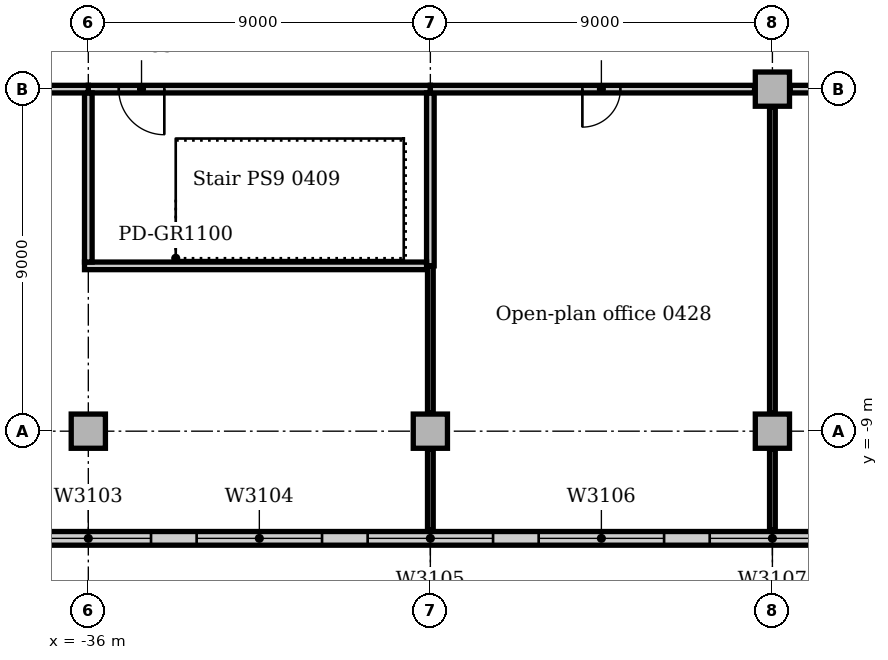
"""IFC4 building model, lengths in metres.
Left out: names, types, materials, properties, quantities, classifications, styles, units other than length and angle.
Written with IfcOpenShell. Run it as: python <this file> out.ifc"""

import sys

from ifc_helpers import new_model, si_unit, direction, frame, frame_2d, origin, origin_2d, place, context, subcontext, project, spatial, rectangle, extrude, element, fill, save


model = new_model("IFC4")
c1 = context("Model", 3, precision=1e-05, world=origin(), true_north=direction((0.0, 1.0)))
c2 = subcontext(c1, "Body", "Model", "MODEL_VIEW")
j1 = project(units=[si_unit("LENGTHUNIT", "METRE"), si_unit("PLANEANGLEUNIT", "RADIAN")], contexts=[c1])
p1 = place(None, origin())
s1 = spatial("IfcSite", under=j1, at=p1, CompositionType="ELEMENT")
p2 = place(p1, origin())
s2 = spatial("IfcBuilding", under=s1, at=p2, CompositionType="ELEMENT")
p3 = place(p2, frame((0.0, 0.0, 21.0)))
s3 = spatial("IfcBuildingStorey", under=s2, at=p3, CompositionType="ELEMENT", Elevation=21.0)
for number, where, z_axis, x_axis in (
    (1, (-36.0, -9.0, 0.0), (0.0, 0.0, 1.0), (1.0, 0.0, 0.0)),
    (2, (-27.0, -9.0, 0.0), (0.0, 0.0, 1.0), (1.0, 0.0, 0.0)),
    (3, (-18.0, -9.0, 0.0), (0.0, 0.0, 1.0), (1.0, 0.0, 0.0)),
    (4, (-18.0, 0.0, 0.0), (0.0, 0.0, 1.0), (1.0, 0.0, 0.0)),
):
    element("IfcColumn", number, at=place(p3, frame(where, z_axis=z_axis, x_axis=x_axis)), inside=s3, PredefinedType="COLUMN", context=c2, shape_type="SweptSolid", body=[
        extrude(rectangle(XDim=0.9, YDim=0.9, at=origin_2d()), origin(), (0.0, 0.0, 1.0), 4.7),
    ])
p4 = place(p3, frame((-81.0, -11.82, 0.0), z_axis=(0.0, 0.0, 1.0), x_axis=(1.0, 0.0, 0.0)))
e5 = element("IfcWall", 5, at=p4, inside=s3, PredefinedType="STANDARD", context=c2, shape_type="SweptSolid", body=[
    extrude(rectangle(XDim=144.0, YDim=0.36, at=frame_2d((72.0, 0.0))), origin(), (0.0, 0.0, 1.0), 4.85),
])
p5 = place(p4, frame((2.85, 0.0, 0.9)))
e6 = element("IfcOpeningElement", 6, at=p5, cuts=e5, PredefinedType="OPENING", context=c2, shape_type="SweptSolid", body=[
    extrude(rectangle(XDim=3.3, YDim=2.4, at=frame_2d((1.65, 1.2))), frame((0.0, 0.19, 0.0), z_axis=(0.0, -1.0, 0.0), x_axis=(1.0, 0.0, 0.0)), (0.0, 0.0, 1.0), 0.38),
])
p6 = place(p4, frame((7.35, 0.0, 0.9)))
e7 = element("IfcOpeningElement", 7, at=p6, cuts=e5, PredefinedType="OPENING", context=c2, shape_type="SweptSolid", body=[
    extrude(rectangle(XDim=3.3, YDim=2.4, at=frame_2d((1.65, 1.2))), frame((0.0, 0.19, 0.0), z_axis=(0.0, -1.0, 0.0), x_axis=(1.0, 0.0, 0.0)), (0.0, 0.0, 1.0), 0.38),
])
p7 = place(p4, frame((11.85, 0.0, 0.9)))
e8 = element("IfcOpeningElement", 8, at=p7, cuts=e5, PredefinedType="OPENING", context=c2, shape_type="SweptSolid", body=[
    extrude(rectangle(XDim=3.3, YDim=2.4, at=frame_2d((1.65, 1.2))), frame((0.0, 0.19, 0.0), z_axis=(0.0, -1.0, 0.0), x_axis=(1.0, 0.0, 0.0)), (0.0, 0.0, 1.0), 0.38),
])
p8 = place(p4, frame((16.35, 0.0, 0.9)))
e9 = element("IfcOpeningElement", 9, at=p8, cuts=e5, PredefinedType="OPENING", context=c2, shape_type="SweptSolid", body=[
    extrude(rectangle(XDim=3.3, YDim=2.4, at=frame_2d((1.65, 1.2))), frame((0.0, 0.19, 0.0), z_axis=(0.0, -1.0, 0.0), x_axis=(1.0, 0.0, 0.0)), (0.0, 0.0, 1.0), 0.38),
])
p9 = place(p4, frame((20.85, 0.0, 0.9)))
e10 = element("IfcOpeningElement", 10, at=p9, cuts=e5, PredefinedType="OPENING", context=c2, shape_type="SweptSolid", body=[
    extrude(rectangle(XDim=3.3, YDim=2.4, at=frame_2d((1.65, 1.2))), frame((0.0, 0.19, 0.0), z_axis=(0.0, -1.0, 0.0), x_axis=(1.0, 0.0, 0.0)), (0.0, 0.0, 1.0), 0.38),
])
p10 = place(p4, frame((25.35, 0.0, 0.9)))
e11 = element("IfcOpeningElement", 11, at=p10, cuts=e5, PredefinedType="OPENING", context=c2, shape_type="SweptSolid", body=[
    extrude(rectangle(XDim=3.3, YDim=2.4, at=frame_2d((1.65, 1.2))), frame((0.0, 0.19, 0.0), z_axis=(0.0, -1.0, 0.0), x_axis=(1.0, 0.0, 0.0)), (0.0, 0.0, 1.0), 0.38),
])
p11 = place(p4, frame((29.85, 0.0, 0.9)))
e12 = element("IfcOpeningElement", 12, at=p11, cuts=e5, PredefinedType="OPENING", context=c2, shape_type="SweptSolid", body=[
    extrude(rectangle(XDim=3.3, YDim=2.4, at=frame_2d((1.65, 1.2))), frame((0.0, 0.19, 0.0), z_axis=(0.0, -1.0, 0.0), x_axis=(1.0, 0.0, 0.0)), (0.0, 0.0, 1.0), 0.38),
])
p12 = place(p4, frame((34.35, 0.0, 0.9)))
e13 = element("IfcOpeningElement", 13, at=p12, cuts=e5, PredefinedType="OPENING", context=c2, shape_type="SweptSolid", body=[
    extrude(rectangle(XDim=3.3, YDim=2.4, at=frame_2d((1.65, 1.2))), frame((0.0, 0.19, 0.0), z_axis=(0.0, -1.0, 0.0), x_axis=(1.0, 0.0, 0.0)), (0.0, 0.0, 1.0), 0.38),
])
p13 = place(p4, frame((38.85, 0.0, 0.9)))
e14 = element("IfcOpeningElement", 14, at=p13, cuts=e5, PredefinedType="OPENING", context=c2, shape_type="SweptSolid", body=[
    extrude(rectangle(XDim=3.3, YDim=2.4, at=frame_2d((1.65, 1.2))), frame((0.0, 0.19, 0.0), z_axis=(0.0, -1.0, 0.0), x_axis=(1.0, 0.0, 0.0)), (0.0, 0.0, 1.0), 0.38),
])
p14 = place(p4, frame((43.35, 0.0, 0.9)))
e15 = element("IfcOpeningElement", 15, at=p14, cuts=e5, PredefinedType="OPENING", context=c2, shape_type="SweptSolid", body=[
    extrude(rectangle(XDim=3.3, YDim=2.4, at=frame_2d((1.65, 1.2))), frame((0.0, 0.19, 0.0), z_axis=(0.0, -1.0, 0.0), x_axis=(1.0, 0.0, 0.0)), (0.0, 0.0, 1.0), 0.38),
])
p15 = place(p4, frame((47.85, 0.0, 0.9)))
e16 = element("IfcOpeningElement", 16, at=p15, cuts=e5, PredefinedType="OPENING", context=c2, shape_type="SweptSolid", body=[
    extrude(rectangle(XDim=3.3, YDim=2.4, at=frame_2d((1.65, 1.2))), frame((0.0, 0.19, 0.0), z_axis=(0.0, -1.0, 0.0), x_axis=(1.0, 0.0, 0.0)), (0.0, 0.0, 1.0), 0.38),
])
p16 = place(p4, frame((52.35, 0.0, 0.9)))
e17 = element("IfcOpeningElement", 17, at=p16, cuts=e5, PredefinedType="OPENING", context=c2, shape_type="SweptSolid", body=[
    extrude(rectangle(XDim=3.3, YDim=2.4, at=frame_2d((1.65, 1.2))), frame((0.0, 0.19, 0.0), z_axis=(0.0, -1.0, 0.0), x_axis=(1.0, 0.0, 0.0)), (0.0, 0.0, 1.0), 0.38),
])
p17 = place(p4, frame((56.85, 0.0, 0.9)))
e18 = element("IfcOpeningElement", 18, at=p17, cuts=e5, PredefinedType="OPENING", context=c2, shape_type="SweptSolid", body=[
    extrude(rectangle(XDim=3.3, YDim=2.4, at=frame_2d((1.65, 1.2))), frame((0.0, 0.19, 0.0), z_axis=(0.0, -1.0, 0.0), x_axis=(1.0, 0.0, 0.0)), (0.0, 0.0, 1.0), 0.38),
])
p18 = place(p4, frame((61.35, 0.0, 0.9)))
e19 = element("IfcOpeningElement", 19, at=p18, cuts=e5, PredefinedType="OPENING", context=c2, shape_type="SweptSolid", body=[
    extrude(rectangle(XDim=3.3, YDim=2.4, at=frame_2d((1.65, 1.2))), frame((0.0, 0.19, 0.0), z_axis=(0.0, -1.0, 0.0), x_axis=(1.0, 0.0, 0.0)), (0.0, 0.0, 1.0), 0.38),
])
p19 = place(p4, frame((65.85, 0.0, 0.9)))
e20 = element("IfcOpeningElement", 20, at=p19, cuts=e5, PredefinedType="OPENING", context=c2, shape_type="SweptSolid", body=[
    extrude(rectangle(XDim=3.3, YDim=2.4, at=frame_2d((1.65, 1.2))), frame((0.0, 0.19, 0.0), z_axis=(0.0, -1.0, 0.0), x_axis=(1.0, 0.0, 0.0)), (0.0, 0.0, 1.0), 0.38),
])
p20 = place(p4, frame((70.35, 0.0, 0.9)))
e21 = element("IfcOpeningElement", 21, at=p20, cuts=e5, PredefinedType="OPENING", context=c2, shape_type="SweptSolid", body=[
    extrude(rectangle(XDim=3.3, YDim=2.4, at=frame_2d((1.65, 1.2))), frame((0.0, 0.19, 0.0), z_axis=(0.0, -1.0, 0.0), x_axis=(1.0, 0.0, 0.0)), (0.0, 0.0, 1.0), 0.38),
])
p21 = place(p4, frame((74.85, 0.0, 0.9)))
e22 = element("IfcOpeningElement", 22, at=p21, cuts=e5, PredefinedType="OPENING", context=c2, shape_type="SweptSolid", body=[
    extrude(rectangle(XDim=3.3, YDim=2.4, at=frame_2d((1.65, 1.2))), frame((0.0, 0.19, 0.0), z_axis=(0.0, -1.0, 0.0), x_axis=(1.0, 0.0, 0.0)), (0.0, 0.0, 1.0), 0.38),
])
p22 = place(p4, frame((79.35, 0.0, 0.9)))
e23 = element("IfcOpeningElement", 23, at=p22, cuts=e5, PredefinedType="OPENING", context=c2, shape_type="SweptSolid", body=[
    extrude(rectangle(XDim=3.3, YDim=2.4, at=frame_2d((1.65, 1.2))), frame((0.0, 0.19, 0.0), z_axis=(0.0, -1.0, 0.0), x_axis=(1.0, 0.0, 0.0)), (0.0, 0.0, 1.0), 0.38),
])
p23 = place(p4, frame((83.85, 0.0, 0.9)))
e24 = element("IfcOpeningElement", 24, at=p23, cuts=e5, PredefinedType="OPENING", context=c2, shape_type="SweptSolid", body=[
    extrude(rectangle(XDim=3.3, YDim=2.4, at=frame_2d((1.65, 1.2))), frame((0.0, 0.19, 0.0), z_axis=(0.0, -1.0, 0.0), x_axis=(1.0, 0.0, 0.0)), (0.0, 0.0, 1.0), 0.38),
])
p24 = place(p4, frame((88.35, 0.0, 0.9)))
e25 = element("IfcOpeningElement", 25, at=p24, cuts=e5, PredefinedType="OPENING", context=c2, shape_type="SweptSolid", body=[
    extrude(rectangle(XDim=3.3, YDim=2.4, at=frame_2d((1.65, 1.2))), frame((0.0, 0.19, 0.0), z_axis=(0.0, -1.0, 0.0), x_axis=(1.0, 0.0, 0.0)), (0.0, 0.0, 1.0), 0.38),
])
p25 = place(p4, frame((92.85, 0.0, 0.9)))
e26 = element("IfcOpeningElement", 26, at=p25, cuts=e5, PredefinedType="OPENING", context=c2, shape_type="SweptSolid", body=[
    extrude(rectangle(XDim=3.3, YDim=2.4, at=frame_2d((1.65, 1.2))), frame((0.0, 0.19, 0.0), z_axis=(0.0, -1.0, 0.0), x_axis=(1.0, 0.0, 0.0)), (0.0, 0.0, 1.0), 0.38),
])
p26 = place(p4, frame((97.35, 0.0, 0.9)))
e27 = element("IfcOpeningElement", 27, at=p26, cuts=e5, PredefinedType="OPENING", context=c2, shape_type="SweptSolid", body=[
    extrude(rectangle(XDim=3.3, YDim=2.4, at=frame_2d((1.65, 1.2))), frame((0.0, 0.19, 0.0), z_axis=(0.0, -1.0, 0.0), x_axis=(1.0, 0.0, 0.0)), (0.0, 0.0, 1.0), 0.38),
])
p27 = place(p4, frame((101.85, 0.0, 0.9)))
e28 = element("IfcOpeningElement", 28, at=p27, cuts=e5, PredefinedType="OPENING", context=c2, shape_type="SweptSolid", body=[
    extrude(rectangle(XDim=3.3, YDim=2.4, at=frame_2d((1.65, 1.2))), frame((0.0, 0.19, 0.0), z_axis=(0.0, -1.0, 0.0), x_axis=(1.0, 0.0, 0.0)), (0.0, 0.0, 1.0), 0.38),
])
p28 = place(p4, frame((106.35, 0.0, 0.9)))
e29 = element("IfcOpeningElement", 29, at=p28, cuts=e5, PredefinedType="OPENING", context=c2, shape_type="SweptSolid", body=[
    extrude(rectangle(XDim=3.3, YDim=2.4, at=frame_2d((1.65, 1.2))), frame((0.0, 0.19, 0.0), z_axis=(0.0, -1.0, 0.0), x_axis=(1.0, 0.0, 0.0)), (0.0, 0.0, 1.0), 0.38),
])
p29 = place(p4, frame((110.85, 0.0, 0.9)))
e30 = element("IfcOpeningElement", 30, at=p29, cuts=e5, PredefinedType="OPENING", context=c2, shape_type="SweptSolid", body=[
    extrude(rectangle(XDim=3.3, YDim=2.4, at=frame_2d((1.65, 1.2))), frame((0.0, 0.19, 0.0), z_axis=(0.0, -1.0, 0.0), x_axis=(1.0, 0.0, 0.0)), (0.0, 0.0, 1.0), 0.38),
])
p30 = place(p4, frame((115.35, 0.0, 0.9)))
e31 = element("IfcOpeningElement", 31, at=p30, cuts=e5, PredefinedType="OPENING", context=c2, shape_type="SweptSolid", body=[
    extrude(rectangle(XDim=3.3, YDim=2.4, at=frame_2d((1.65, 1.2))), frame((0.0, 0.19, 0.0), z_axis=(0.0, -1.0, 0.0), x_axis=(1.0, 0.0, 0.0)), (0.0, 0.0, 1.0), 0.38),
])
p31 = place(p4, frame((119.85, 0.0, 0.9)))
e32 = element("IfcOpeningElement", 32, at=p31, cuts=e5, PredefinedType="OPENING", context=c2, shape_type="SweptSolid", body=[
    extrude(rectangle(XDim=3.3, YDim=2.4, at=frame_2d((1.65, 1.2))), frame((0.0, 0.19, 0.0), z_axis=(0.0, -1.0, 0.0), x_axis=(1.0, 0.0, 0.0)), (0.0, 0.0, 1.0), 0.38),
])
p32 = place(p4, frame((124.35, 0.0, 0.9)))
e33 = element("IfcOpeningElement", 33, at=p32, cuts=e5, PredefinedType="OPENING", context=c2, shape_type="SweptSolid", body=[
    extrude(rectangle(XDim=3.3, YDim=2.4, at=frame_2d((1.65, 1.2))), frame((0.0, 0.19, 0.0), z_axis=(0.0, -1.0, 0.0), x_axis=(1.0, 0.0, 0.0)), (0.0, 0.0, 1.0), 0.38),
])
p33 = place(p4, frame((128.85, 0.0, 0.9)))
e34 = element("IfcOpeningElement", 34, at=p33, cuts=e5, PredefinedType="OPENING", context=c2, shape_type="SweptSolid", body=[
    extrude(rectangle(XDim=3.3, YDim=2.4, at=frame_2d((1.65, 1.2))), frame((0.0, 0.19, 0.0), z_axis=(0.0, -1.0, 0.0), x_axis=(1.0, 0.0, 0.0)), (0.0, 0.0, 1.0), 0.38),
])
p34 = place(p4, frame((133.35, 0.0, 0.9)))
e35 = element("IfcOpeningElement", 35, at=p34, cuts=e5, PredefinedType="OPENING", context=c2, shape_type="SweptSolid", body=[
    extrude(rectangle(XDim=3.3, YDim=2.4, at=frame_2d((1.65, 1.2))), frame((0.0, 0.19, 0.0), z_axis=(0.0, -1.0, 0.0), x_axis=(1.0, 0.0, 0.0)), (0.0, 0.0, 1.0), 0.38),
])
p35 = place(p4, frame((137.85, 0.0, 0.9)))
e36 = element("IfcOpeningElement", 36, at=p35, cuts=e5, PredefinedType="OPENING", context=c2, shape_type="SweptSolid", body=[
    extrude(rectangle(XDim=3.3, YDim=2.4, at=frame_2d((1.65, 1.2))), frame((0.0, 0.19, 0.0), z_axis=(0.0, -1.0, 0.0), x_axis=(1.0, 0.0, 0.0)), (0.0, 0.0, 1.0), 0.38),
])
p36 = place(p3, frame((-36.0, 0.0, 0.0), z_axis=(0.0, 0.0, 1.0), x_axis=(1.0, 0.0, 0.0)))
e37 = element("IfcWall", 37, at=p36, inside=s3, PredefinedType="SOLIDWALL", context=c2, shape_type="SweptSolid", body=[
    extrude(rectangle(XDim=9.0, YDim=0.2, at=frame_2d((4.5, 0.0))), origin(), (0.0, 0.0, 1.0), 4.7),
])
p37 = place(p36, frame((0.8, 0.0, 0.0)))
e38 = element("IfcOpeningElement", 38, at=p37, cuts=e37, PredefinedType="OPENING", context=c2, shape_type="SweptSolid", body=[
    extrude(rectangle(XDim=1.2, YDim=2.1, at=frame_2d((0.6, 1.05))), frame((0.0, 0.11, 0.0), z_axis=(0.0, -1.0, 0.0), x_axis=(1.0, 0.0, 0.0)), (0.0, 0.0, 1.0), 0.22),
])
p38 = place(p3, frame((-27.0, -4.65, 0.0), z_axis=(0.0, 0.0, 1.0), x_axis=(0.0, 1.0, 0.0)))
e39 = element("IfcWall", 39, at=p38, inside=s3, PredefinedType="SOLIDWALL", context=c2, shape_type="SweptSolid", body=[
    extrude(rectangle(XDim=4.55, YDim=0.2, at=frame_2d((2.275, 0.0))), origin(), (0.0, 0.0, 1.0), 4.7),
])
p39 = place(p3, frame((-36.1, -4.65, 0.0), z_axis=(0.0, 0.0, 1.0), x_axis=(1.0, 0.0, 0.0)))
e40 = element("IfcWall", 40, at=p39, inside=s3, PredefinedType="SOLIDWALL", context=c2, shape_type="SweptSolid", body=[
    extrude(rectangle(XDim=9.0, YDim=0.2, at=frame_2d((4.5, 0.0))), origin(), (0.0, 0.0, 1.0), 4.7),
])
p40 = place(p3, frame((-36.0, -4.55, 0.0), z_axis=(0.0, 0.0, 1.0), x_axis=(0.0, 1.0, 0.0)))
e41 = element("IfcWall", 41, at=p40, inside=s3, PredefinedType="SOLIDWALL", context=c2, shape_type="SweptSolid", body=[
    extrude(rectangle(XDim=4.45, YDim=0.2, at=frame_2d((2.225, 0.0))), origin(), (0.0, 0.0, 1.0), 4.7),
])
p41 = place(p3, frame((-45.0, 0.0, 0.0), z_axis=(0.0, 0.0, 1.0), x_axis=(1.0, 0.0, 0.0)))
e42 = element("IfcWall", 42, at=p41, inside=s3, PredefinedType="PARTITIONING", context=c2, shape_type="SweptSolid", body=[
    extrude(rectangle(XDim=9.0, YDim=0.2, at=frame_2d((4.5, 0.0))), origin(), (0.0, 0.0, 1.0), 4.7),
])
p42 = place(p41, frame((4.0, 0.0, 0.0)))
e43 = element("IfcOpeningElement", 43, at=p42, cuts=e42, PredefinedType="OPENING", context=c2, shape_type="SweptSolid", body=[
    extrude(rectangle(XDim=1.0, YDim=2.1, at=frame_2d((0.5, 1.05))), frame((0.0, 0.11, 0.0), z_axis=(0.0, -1.0, 0.0), x_axis=(1.0, 0.0, 0.0)), (0.0, 0.0, 1.0), 0.22),
])
p43 = place(p3, frame((-27.0, 0.0, 0.0), z_axis=(0.0, 0.0, 1.0), x_axis=(1.0, 0.0, 0.0)))
e44 = element("IfcWall", 44, at=p43, inside=s3, PredefinedType="PARTITIONING", context=c2, shape_type="SweptSolid", body=[
    extrude(rectangle(XDim=8.53, YDim=0.2, at=frame_2d((4.265, 0.0))), origin(), (0.0, 0.0, 1.0), 4.7),
])
p44 = place(p43, frame((4.0, 0.0, 0.0)))
e45 = element("IfcOpeningElement", 45, at=p44, cuts=e44, PredefinedType="OPENING", context=c2, shape_type="SweptSolid", body=[
    extrude(rectangle(XDim=1.0, YDim=2.1, at=frame_2d((0.5, 1.05))), frame((0.0, 0.11, 0.0), z_axis=(0.0, -1.0, 0.0), x_axis=(1.0, 0.0, 0.0)), (0.0, 0.0, 1.0), 0.22),
])
p45 = place(p3, frame((-17.53, 0.0, 0.0), z_axis=(0.0, 0.0, 1.0), x_axis=(1.0, 0.0, 0.0)))
e46 = element("IfcWall", 46, at=p45, inside=s3, PredefinedType="PARTITIONING", context=c2, shape_type="SweptSolid", body=[
    extrude(rectangle(XDim=8.06, YDim=0.2, at=frame_2d((4.03, 0.0))), origin(), (0.0, 0.0, 1.0), 4.7),
])
p46 = place(p45, frame((3.53, 0.0, 0.0)))
e47 = element("IfcOpeningElement", 47, at=p46, cuts=e46, PredefinedType="OPENING", context=c2, shape_type="SweptSolid", body=[
    extrude(rectangle(XDim=1.0, YDim=2.1, at=frame_2d((0.5, 1.05))), frame((0.0, 0.11, 0.0), z_axis=(0.0, -1.0, 0.0), x_axis=(1.0, 0.0, 0.0)), (0.0, 0.0, 1.0), 0.22),
])
p47 = place(p3, frame((-18.0, -11.6, 0.0), z_axis=(0.0, 0.0, 1.0), x_axis=(0.0, 1.0, 0.0)))
e48 = element("IfcWall", 48, at=p47, inside=s3, PredefinedType="PARTITIONING", context=c2, shape_type="SweptSolid", body=[
    extrude(rectangle(XDim=2.13, YDim=0.15, at=frame_2d((1.065, 0.0))), origin(), (0.0, 0.0, 1.0), 4.7),
])
p48 = place(p3, frame((-18.0, -8.53, 0.0), z_axis=(0.0, 0.0, 1.0), x_axis=(0.0, 1.0, 0.0)))
e49 = element("IfcWall", 49, at=p48, inside=s3, PredefinedType="PARTITIONING", context=c2, shape_type="SweptSolid", body=[
    extrude(rectangle(XDim=8.06, YDim=0.15, at=frame_2d((4.03, 0.0))), origin(), (0.0, 0.0, 1.0), 4.7),
])
p49 = place(p3, frame((-27.0, -11.6, 0.0), z_axis=(0.0, 0.0, 1.0), x_axis=(0.0, 1.0, 0.0)))
e50 = element("IfcWall", 50, at=p49, inside=s3, PredefinedType="PARTITIONING", context=c2, shape_type="SweptSolid", body=[
    extrude(rectangle(XDim=2.13, YDim=0.15, at=frame_2d((1.065, 0.0))), origin(), (0.0, 0.0, 1.0), 4.7),
])
p50 = place(p3, frame((-27.0, -8.53, 0.0), z_axis=(0.0, 0.0, 1.0), x_axis=(0.0, 1.0, 0.0)))
e51 = element("IfcWall", 51, at=p50, inside=s3, PredefinedType="PARTITIONING", context=c2, shape_type="SweptSolid", body=[
    extrude(rectangle(XDim=3.88, YDim=0.15, at=frame_2d((1.94, 0.0))), origin(), (0.0, 0.0, 1.0), 4.7),
])
p51 = place(p14, origin())
e52 = element("IfcWindow", 52, at=p51, inside=s3, PartitioningType="SINGLE_PANEL", PredefinedType="WINDOW", context=c2, shape_type="SweptSolid", body=[
    extrude(rectangle(XDim=3.3, YDim=2.4, at=frame_2d((1.65, 1.2))), frame((0.0, 0.13, 0.0), z_axis=(0.0, -1.0, 0.0), x_axis=(1.0, 0.0, 0.0)), (0.0, 0.0, 1.0), 0.06),
])
fill(e15, e52)
p52 = place(p15, origin())
e53 = element("IfcWindow", 53, at=p52, inside=s3, PartitioningType="SINGLE_PANEL", PredefinedType="WINDOW", context=c2, shape_type="SweptSolid", body=[
    extrude(rectangle(XDim=3.3, YDim=2.4, at=frame_2d((1.65, 1.2))), frame((0.0, 0.13, 0.0), z_axis=(0.0, -1.0, 0.0), x_axis=(1.0, 0.0, 0.0)), (0.0, 0.0, 1.0), 0.06),
])
fill(e16, e53)
p53 = place(p16, origin())
e54 = element("IfcWindow", 54, at=p53, inside=s3, PartitioningType="SINGLE_PANEL", PredefinedType="WINDOW", context=c2, shape_type="SweptSolid", body=[
    extrude(rectangle(XDim=3.3, YDim=2.4, at=frame_2d((1.65, 1.2))), frame((0.0, 0.13, 0.0), z_axis=(0.0, -1.0, 0.0), x_axis=(1.0, 0.0, 0.0)), (0.0, 0.0, 1.0), 0.06),
])
fill(e17, e54)
p54 = place(p17, origin())
e55 = element("IfcWindow", 55, at=p54, inside=s3, PartitioningType="SINGLE_PANEL", PredefinedType="WINDOW", context=c2, shape_type="SweptSolid", body=[
    extrude(rectangle(XDim=3.3, YDim=2.4, at=frame_2d((1.65, 1.2))), frame((0.0, 0.13, 0.0), z_axis=(0.0, -1.0, 0.0), x_axis=(1.0, 0.0, 0.0)), (0.0, 0.0, 1.0), 0.06),
])
fill(e18, e55)
p55 = place(p18, origin())
e56 = element("IfcWindow", 56, at=p55, inside=s3, PartitioningType="SINGLE_PANEL", PredefinedType="WINDOW", context=c2, shape_type="SweptSolid", body=[
    extrude(rectangle(XDim=3.3, YDim=2.4, at=frame_2d((1.65, 1.2))), frame((0.0, 0.13, 0.0), z_axis=(0.0, -1.0, 0.0), x_axis=(1.0, 0.0, 0.0)), (0.0, 0.0, 1.0), 0.06),
])
fill(e19, e56)
p56 = place(p44, frame((1.0, 0.0, 0.0), z_axis=(0.0, 0.0, 1.0), x_axis=(-1.0, 0.0, 0.0)))
e57 = element("IfcDoor", 57, at=p56, inside=s3, OperationType="SINGLE_SWING_RIGHT", PredefinedType="DOOR", context=c2, shape_type="SweptSolid", body=[
    extrude(rectangle(XDim=1.0, YDim=2.1, at=frame_2d((0.5, 1.05))), frame((0.0, 0.025, 0.0), z_axis=(0.0, -1.0, 0.0), x_axis=(1.0, 0.0, 0.0)), (0.0, 0.0, 1.0), 0.05),
])
fill(e45, e57)
p57 = place(p37, frame((1.2, 0.0, 0.0), z_axis=(0.0, 0.0, 1.0), x_axis=(-1.0, 0.0, 0.0)))
e58 = element("IfcDoor", 58, at=p57, inside=s3, OperationType="SINGLE_SWING_LEFT", PredefinedType="DOOR", context=c2, shape_type="SweptSolid", body=[
    extrude(rectangle(XDim=1.2, YDim=2.1, at=frame_2d((0.6, 1.05))), frame((0.0, 0.025, 0.0), z_axis=(0.0, -1.0, 0.0), x_axis=(1.0, 0.0, 0.0)), (0.0, 0.0, 1.0), 0.05),
])
fill(e38, e58)
save(model, sys.argv[1])
